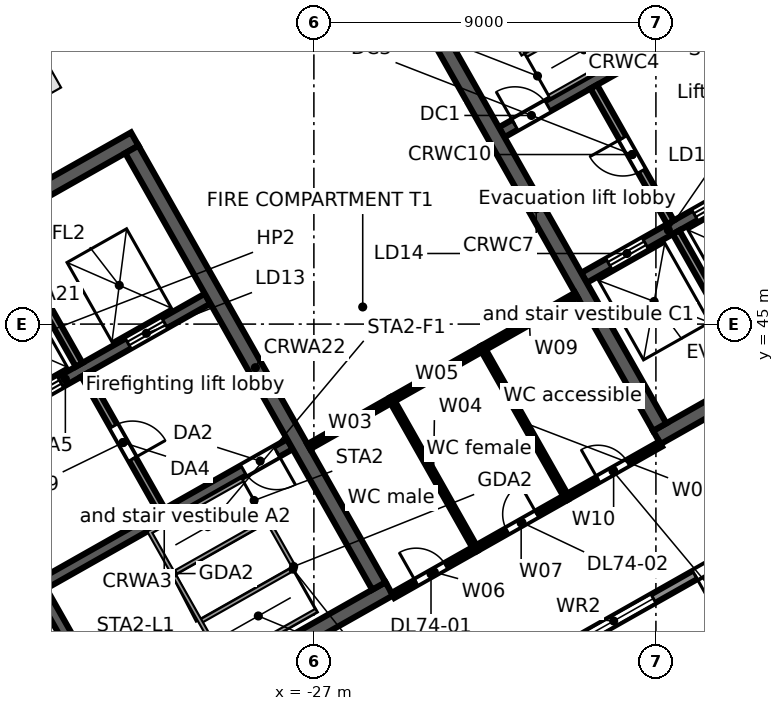
"""IFC4 building model, lengths in metres.
Left out: names, types, materials, properties, quantities, classifications, styles, units other than length and angle.
Written with IfcOpenShell. Run it as: python <this file> out.ifc"""

import sys

from ifc_helpers import new_model, si_unit, direction, frame, frame_2d, origin, origin_2d, place, context, subcontext, project, spatial, rectangle, extrude, element, fill, save


model = new_model("IFC4")
c1 = context("Model", 3, precision=1e-05, world=origin(), true_north=direction((0.0, 1.0)))
c2 = subcontext(c1, "Body", "Model", "MODEL_VIEW")
j1 = project(units=[si_unit("LENGTHUNIT", "METRE"), si_unit("PLANEANGLEUNIT", "RADIAN")], contexts=[c1])
p1 = place(None, origin())
s1 = spatial("IfcSite", under=j1, at=p1, CompositionType="ELEMENT")
p2 = place(p1, origin())
s2 = spatial("IfcBuilding", under=s1, at=p2, CompositionType="ELEMENT")
p3 = place(p2, frame((0.0, 0.0, 335.5)))
s3 = spatial("IfcBuildingStorey", under=s2, at=p3, CompositionType="ELEMENT", Elevation=335.5)
p4 = place(p3, frame((-34.334, 51.414, 0.0), z_axis=(0.0, 0.0, 1.0), x_axis=(-0.87035569594, -0.492423560103, 0.0)))
e1 = element("IfcColumn", 1, at=p4, inside=s3, PredefinedType="COLUMN", context=c2, shape_type="SweptSolid", body=[
    extrude(rectangle(XDim=1.0, YDim=1.0, at=origin_2d()), origin(), (0.0, 0.0, 1.0), 3.8),
])
p5 = place(p3, frame((-3.017, 46.293, 0.0), z_axis=(0.0, 0.0, 1.0), x_axis=(-0.870355474887, -0.492423950812, 0.0)))
e2 = element("IfcWall", 2, at=p5, inside=s3, PredefinedType="STANDARD", context=c2, shape_type="SweptSolid", body=[
    extrude(rectangle(XDim=40.34, YDim=0.25, at=frame_2d((20.17, 0.0))), origin(), (0.0, 0.0, 1.0), 3.52),
])
p6 = place(p5, frame((37.428, 0.0, 0.8)))
e3 = element("IfcOpeningElement", 3, at=p6, cuts=e2, PredefinedType="OPENING", context=c2, shape_type="SweptSolid", body=[
    extrude(rectangle(XDim=2.4, YDim=2.2, at=frame_2d((1.2, 1.1))), frame((0.0, 0.135, 0.0), z_axis=(0.0, -1.0, 0.0), x_axis=(1.0, 0.0, 0.0)), (0.0, 0.0, 1.0), 0.27),
])
p7 = place(p5, frame((34.372, 0.0, 0.0)))
e4 = element("IfcOpeningElement", 4, at=p7, cuts=e2, PredefinedType="OPENING", context=c2, shape_type="SweptSolid", body=[
    extrude(rectangle(XDim=1.8, YDim=2.4, at=frame_2d((0.9, 1.2))), frame((0.0, 0.135, 0.0), z_axis=(0.0, -1.0, 0.0), x_axis=(1.0, 0.0, 0.0)), (0.0, 0.0, 1.0), 0.27),
])
p8 = place(p5, frame((30.716, 0.0, 0.8)))
e5 = element("IfcOpeningElement", 5, at=p8, cuts=e2, PredefinedType="OPENING", context=c2, shape_type="SweptSolid", body=[
    extrude(rectangle(XDim=2.4, YDim=2.2, at=frame_2d((1.2, 1.1))), frame((0.0, 0.135, 0.0), z_axis=(0.0, -1.0, 0.0), x_axis=(1.0, 0.0, 0.0)), (0.0, 0.0, 1.0), 0.27),
])
p9 = place(p5, frame((27.36, 0.0, 0.8)))
e6 = element("IfcOpeningElement", 6, at=p9, cuts=e2, PredefinedType="OPENING", context=c2, shape_type="SweptSolid", body=[
    extrude(rectangle(XDim=2.4, YDim=2.2, at=frame_2d((1.2, 1.1))), frame((0.0, 0.135, 0.0), z_axis=(0.0, -1.0, 0.0), x_axis=(1.0, 0.0, 0.0)), (0.0, 0.0, 1.0), 0.27),
])
p10 = place(p5, frame((24.304, 0.0, 0.0)))
e7 = element("IfcOpeningElement", 7, at=p10, cuts=e2, PredefinedType="OPENING", context=c2, shape_type="SweptSolid", body=[
    extrude(rectangle(XDim=1.8, YDim=2.4, at=frame_2d((0.9, 1.2))), frame((0.0, 0.135, 0.0), z_axis=(0.0, -1.0, 0.0), x_axis=(1.0, 0.0, 0.0)), (0.0, 0.0, 1.0), 0.27),
])
p11 = place(p5, frame((20.648, 0.0, 0.8)))
e8 = element("IfcOpeningElement", 8, at=p11, cuts=e2, PredefinedType="OPENING", context=c2, shape_type="SweptSolid", body=[
    extrude(rectangle(XDim=2.4, YDim=2.2, at=frame_2d((1.2, 1.1))), frame((0.0, 0.135, 0.0), z_axis=(0.0, -1.0, 0.0), x_axis=(1.0, 0.0, 0.0)), (0.0, 0.0, 1.0), 0.27),
])
p12 = place(p5, frame((17.292, 0.0, 0.8)))
e9 = element("IfcOpeningElement", 9, at=p12, cuts=e2, PredefinedType="OPENING", context=c2, shape_type="SweptSolid", body=[
    extrude(rectangle(XDim=2.4, YDim=2.2, at=frame_2d((1.2, 1.1))), frame((0.0, 0.135, 0.0), z_axis=(0.0, -1.0, 0.0), x_axis=(1.0, 0.0, 0.0)), (0.0, 0.0, 1.0), 0.27),
])
p13 = place(p5, frame((14.236, 0.0, 0.0)))
e10 = element("IfcOpeningElement", 10, at=p13, cuts=e2, PredefinedType="OPENING", context=c2, shape_type="SweptSolid", body=[
    extrude(rectangle(XDim=1.8, YDim=2.4, at=frame_2d((0.9, 1.2))), frame((0.0, 0.135, 0.0), z_axis=(0.0, -1.0, 0.0), x_axis=(1.0, 0.0, 0.0)), (0.0, 0.0, 1.0), 0.27),
])
p14 = place(p5, frame((10.58, 0.0, 0.8)))
e11 = element("IfcOpeningElement", 11, at=p14, cuts=e2, PredefinedType="OPENING", context=c2, shape_type="SweptSolid", body=[
    extrude(rectangle(XDim=2.4, YDim=2.2, at=frame_2d((1.2, 1.1))), frame((0.0, 0.135, 0.0), z_axis=(0.0, -1.0, 0.0), x_axis=(1.0, 0.0, 0.0)), (0.0, 0.0, 1.0), 0.27),
])
p15 = place(p5, frame((7.224, 0.0, 0.8)))
e12 = element("IfcOpeningElement", 12, at=p15, cuts=e2, PredefinedType="OPENING", context=c2, shape_type="SweptSolid", body=[
    extrude(rectangle(XDim=2.4, YDim=2.2, at=frame_2d((1.2, 1.1))), frame((0.0, 0.135, 0.0), z_axis=(0.0, -1.0, 0.0), x_axis=(1.0, 0.0, 0.0)), (0.0, 0.0, 1.0), 0.27),
])
p16 = place(p5, frame((4.168, 0.0, 0.0)))
e13 = element("IfcOpeningElement", 13, at=p16, cuts=e2, PredefinedType="OPENING", context=c2, shape_type="SweptSolid", body=[
    extrude(rectangle(XDim=1.8, YDim=2.4, at=frame_2d((0.9, 1.2))), frame((0.0, 0.135, 0.0), z_axis=(0.0, -1.0, 0.0), x_axis=(1.0, 0.0, 0.0)), (0.0, 0.0, 1.0), 0.27),
])
p17 = place(p5, frame((0.512, 0.0, 0.8)))
e14 = element("IfcOpeningElement", 14, at=p17, cuts=e2, PredefinedType="OPENING", context=c2, shape_type="SweptSolid", body=[
    extrude(rectangle(XDim=2.4, YDim=2.2, at=frame_2d((1.2, 1.1))), frame((0.0, 0.135, 0.0), z_axis=(0.0, -1.0, 0.0), x_axis=(1.0, 0.0, 0.0)), (0.0, 0.0, 1.0), 0.27),
])
p18 = place(p3, frame((-39.813, 29.662, 0.0), z_axis=(0.0, 0.0, 1.0), x_axis=(0.870350116061, 0.492433422375, 0.0)))
e15 = element("IfcWall", 15, at=p18, inside=s3, PredefinedType="SOLIDWALL", context=c2, shape_type="SweptSolid", body=[
    extrude(rectangle(XDim=17.0, YDim=0.4, at=frame_2d((8.5, 0.0))), origin(), (0.0, 0.0, 1.0), 3.52),
])
p19 = place(p18, frame((7.2, 0.0, 0.0)))
e16 = element("IfcOpeningElement", 16, at=p19, cuts=e15, PredefinedType="OPENING", context=c2, shape_type="SweptSolid", body=[
    extrude(rectangle(XDim=1.2, YDim=2.1, at=frame_2d((0.6, 1.05))), frame((0.0, 0.21, 0.0), z_axis=(0.0, -1.0, 0.0), x_axis=(1.0, 0.0, 0.0)), (0.0, 0.0, 1.0), 0.42),
])
p20 = place(p3, frame((-34.245, 38.097, 0.0), z_axis=(0.0, 0.0, 1.0), x_axis=(0.870356351998, 0.492422400523, 0.0)))
e17 = element("IfcWall", 17, at=p20, inside=s3, PredefinedType="SOLIDWALL", context=c2, shape_type="SweptSolid", body=[
    extrude(rectangle(XDim=7.6, YDim=0.3, at=frame_2d((3.8, 0.0))), origin(), (0.0, 0.0, 1.0), 3.52),
])
p21 = place(p20, frame((6.2, 0.0, 0.0)))
e18 = element("IfcOpeningElement", 18, at=p21, cuts=e17, PredefinedType="OPENING", context=c2, shape_type="SweptSolid", body=[
    extrude(rectangle(XDim=1.0, YDim=2.1, at=frame_2d((0.5, 1.05))), frame((0.0, 0.16, 0.0), z_axis=(0.0, -1.0, 0.0), x_axis=(1.0, 0.0, 0.0)), (0.0, 0.0, 1.0), 0.32),
])
p22 = place(p3, frame((-37.282, 41.435, 0.0), z_axis=(0.0, 0.0, 1.0), x_axis=(0.870361315115, 0.492413628113, 0.0)))
e19 = element("IfcWall", 19, at=p22, inside=s3, PredefinedType="SOLIDWALL", context=c2, shape_type="SweptSolid", body=[
    extrude(rectangle(XDim=8.6, YDim=0.3, at=frame_2d((4.3, 0.0))), origin(), (0.0, 0.0, 1.0), 3.52),
])
p23 = place(p22, frame((0.65, 0.0, 0.0)))
e20 = element("IfcOpeningElement", 20, at=p23, cuts=e19, PredefinedType="OPENING", context=c2, shape_type="SweptSolid", body=[
    extrude(rectangle(XDim=1.1, YDim=2.1, at=frame_2d((0.55, 1.05))), frame((0.0, 0.16, 0.0), z_axis=(0.0, -1.0, 0.0), x_axis=(1.0, 0.0, 0.0)), (0.0, 0.0, 1.0), 0.32),
])
p24 = place(p22, frame((3.05, 0.0, 0.0)))
e21 = element("IfcOpeningElement", 21, at=p24, cuts=e19, PredefinedType="OPENING", context=c2, shape_type="SweptSolid", body=[
    extrude(rectangle(XDim=1.1, YDim=2.1, at=frame_2d((0.55, 1.05))), frame((0.0, 0.16, 0.0), z_axis=(0.0, -1.0, 0.0), x_axis=(1.0, 0.0, 0.0)), (0.0, 0.0, 1.0), 0.32),
])
p25 = place(p22, frame((6.2, 0.0, 0.0)))
e22 = element("IfcOpeningElement", 22, at=p25, cuts=e19, PredefinedType="OPENING", context=c2, shape_type="SweptSolid", body=[
    extrude(rectangle(XDim=1.1, YDim=2.1, at=frame_2d((0.55, 1.05))), frame((0.0, 0.16, 0.0), z_axis=(0.0, -1.0, 0.0), x_axis=(1.0, 0.0, 0.0)), (0.0, 0.0, 1.0), 0.32),
])
p26 = place(p3, frame((-46.51, 41.499, 0.0), z_axis=(0.0, 0.0, 1.0), x_axis=(0.870356271124, 0.492422543467, 0.0)))
e23 = element("IfcWall", 23, at=p26, inside=s3, PredefinedType="SOLIDWALL", context=c2, shape_type="SweptSolid", body=[
    extrude(rectangle(XDim=17.0, YDim=0.4, at=frame_2d((8.5, 0.0))), origin(), (0.0, 0.0, 1.0), 3.52),
])
p27 = place(p3, frame((-34.171, 37.967, 0.0), z_axis=(0.0, 0.0, 1.0), x_axis=(0.492422543467, -0.870356271124, 0.0)))
e24 = element("IfcWall", 24, at=p27, inside=s3, PredefinedType="SOLIDWALL", context=c2, shape_type="SweptSolid", body=[
    extrude(rectangle(XDim=4.25, YDim=0.3, at=frame_2d((2.125, 0.0))), origin(), (0.0, 0.0, 1.0), 3.52),
])
p28 = place(p3, frame((-33.031, 43.667, 0.0), z_axis=(0.0, 0.0, 1.0), x_axis=(0.492408451753, -0.87036424366, 0.0)))
e25 = element("IfcWall", 25, at=p28, inside=s3, PredefinedType="PARTITIONING", context=c2, shape_type="SweptSolid", body=[
    extrude(rectangle(XDim=4.1, YDim=0.2, at=frame_2d((2.05, 0.0))), origin(), (0.0, 0.0, 1.0), 3.52),
])
p29 = place(p28, frame((1.55, 0.0, 0.0)))
e26 = element("IfcOpeningElement", 26, at=p29, cuts=e25, PredefinedType="OPENING", context=c2, shape_type="SweptSolid", body=[
    extrude(rectangle(XDim=1.0, YDim=2.1, at=frame_2d((0.5, 1.05))), frame((0.0, 0.11, 0.0), z_axis=(0.0, -1.0, 0.0), x_axis=(1.0, 0.0, 0.0)), (0.0, 0.0, 1.0), 0.22),
])
p30 = place(p3, frame((-35.271, 47.628, 0.0), z_axis=(0.0, 0.0, 1.0), x_axis=(0.492422543467, -0.870356271124, 0.0)))
e27 = element("IfcWall", 27, at=p30, inside=s3, PredefinedType="SOLIDWALL", context=c2, shape_type="SweptSolid", body=[
    extrude(rectangle(XDim=4.25, YDim=0.2, at=frame_2d((2.125, 0.0))), origin(), (0.0, 0.0, 1.0), 3.52),
])
p31 = place(p3, frame((-31.79, 49.597, 0.0), z_axis=(0.0, 0.0, 1.0), x_axis=(0.492421663121, -0.870356769198, 0.0)))
e28 = element("IfcWall", 28, at=p31, inside=s3, PredefinedType="SOLIDWALL", context=c2, shape_type="SweptSolid", body=[
    extrude(rectangle(XDim=13.2, YDim=0.4, at=frame_2d((6.6, 0.0))), origin(), (0.0, 0.0, 1.0), 3.52),
])
p32 = place(p3, frame((-17.975, 42.017, 0.0), z_axis=(0.0, 0.0, 1.0), x_axis=(0.87034965173, 0.492434243055, 0.0)))
e29 = element("IfcWall", 29, at=p32, inside=s3, PredefinedType="SOLIDWALL", context=c2, shape_type="SweptSolid", body=[
    extrude(rectangle(XDim=15.0, YDim=0.4, at=frame_2d((7.5, 0.0))), origin(), (0.0, 0.0, 1.0), 3.52),
])
p33 = place(p32, frame((6.1, 0.0, 0.0)))
e30 = element("IfcOpeningElement", 30, at=p33, cuts=e29, PredefinedType="OPENING", context=c2, shape_type="SweptSolid", body=[
    extrude(rectangle(XDim=1.2, YDim=2.1, at=frame_2d((0.6, 1.05))), frame((0.0, 0.21, 0.0), z_axis=(0.0, -1.0, 0.0), x_axis=(1.0, 0.0, 0.0)), (0.0, 0.0, 1.0), 0.42),
])
p34 = place(p3, frame((-19.892, 46.218, 0.0), z_axis=(0.0, 0.0, 1.0), x_axis=(0.870341639186, 0.492448404505, 0.0)))
e31 = element("IfcWall", 31, at=p34, inside=s3, PredefinedType="SOLIDWALL", context=c2, shape_type="SweptSolid", body=[
    extrude(rectangle(XDim=5.1, YDim=0.3, at=frame_2d((2.55, 0.0))), origin(), (0.0, 0.0, 1.0), 3.52),
])
p35 = place(p34, frame((0.75, 0.0, 0.0)))
e32 = element("IfcOpeningElement", 32, at=p35, cuts=e31, PredefinedType="OPENING", context=c2, shape_type="SweptSolid", body=[
    extrude(rectangle(XDim=1.1, YDim=2.1, at=frame_2d((0.55, 1.05))), frame((0.0, 0.16, 0.0), z_axis=(0.0, -1.0, 0.0), x_axis=(1.0, 0.0, 0.0)), (0.0, 0.0, 1.0), 0.32),
])
p36 = place(p34, frame((3.35, 0.0, 0.0)))
e33 = element("IfcOpeningElement", 33, at=p36, cuts=e31, PredefinedType="OPENING", context=c2, shape_type="SweptSolid", body=[
    extrude(rectangle(XDim=1.1, YDim=2.1, at=frame_2d((0.55, 1.05))), frame((0.0, 0.16, 0.0), z_axis=(0.0, -1.0, 0.0), x_axis=(1.0, 0.0, 0.0)), (0.0, 0.0, 1.0), 0.32),
])
p37 = place(p3, frame((-22.059, 50.047, 0.0), z_axis=(0.0, 0.0, 1.0), x_axis=(0.87035077051, 0.49243226567, 0.0)))
e34 = element("IfcWall", 34, at=p37, inside=s3, PredefinedType="SOLIDWALL", context=c2, shape_type="SweptSolid", body=[
    extrude(rectangle(XDim=7.4, YDim=0.3, at=frame_2d((3.7, 0.0))), origin(), (0.0, 0.0, 1.0), 3.52),
])
p38 = place(p37, frame((0.4, 0.0, 0.0)))
e35 = element("IfcOpeningElement", 35, at=p38, cuts=e34, PredefinedType="OPENING", context=c2, shape_type="SweptSolid", body=[
    extrude(rectangle(XDim=1.0, YDim=2.1, at=frame_2d((0.5, 1.05))), frame((0.0, 0.16, 0.0), z_axis=(0.0, -1.0, 0.0), x_axis=(1.0, 0.0, 0.0)), (0.0, 0.0, 1.0), 0.32),
])
p39 = place(p3, frame((-24.4, 53.779, 0.0), z_axis=(0.0, 0.0, 1.0), x_axis=(0.492421663121, -0.870356769198, 0.0)))
e36 = element("IfcWall", 36, at=p39, inside=s3, PredefinedType="SOLIDWALL", context=c2, shape_type="SweptSolid", body=[
    extrude(rectangle(XDim=13.2, YDim=0.4, at=frame_2d((6.6, 0.0))), origin(), (0.0, 0.0, 1.0), 3.52),
])
p40 = place(p3, frame((-17.469, 47.417, 0.0), z_axis=(0.0, 0.0, 1.0), x_axis=(0.492466057713, -0.870331650579, 0.0)))
e37 = element("IfcWall", 37, at=p40, inside=s3, PredefinedType="SOLIDWALL", context=c2, shape_type="SweptSolid", body=[
    extrude(rectangle(XDim=4.25, YDim=0.2, at=frame_2d((2.125, 0.0))), origin(), (0.0, 0.0, 1.0), 3.52),
])
p41 = place(p3, frame((-19.635, 51.246, 0.0), z_axis=(0.0, 0.0, 1.0), x_axis=(0.492408451753, -0.87036424366, 0.0)))
e38 = element("IfcWall", 38, at=p41, inside=s3, PredefinedType="PARTITIONING", context=c2, shape_type="SweptSolid", body=[
    extrude(rectangle(XDim=4.1, YDim=0.2, at=frame_2d((2.05, 0.0))), origin(), (0.0, 0.0, 1.0), 3.52),
])
p42 = place(p41, frame((1.55, 0.0, 0.0)))
e39 = element("IfcOpeningElement", 39, at=p42, cuts=e38, PredefinedType="OPENING", context=c2, shape_type="SweptSolid", body=[
    extrude(rectangle(XDim=1.0, YDim=2.1, at=frame_2d((0.5, 1.05))), frame((0.0, 0.11, 0.0), z_axis=(0.0, -1.0, 0.0), x_axis=(1.0, 0.0, 0.0)), (0.0, 0.0, 1.0), 0.22),
])
p43 = place(p3, frame((-27.134, 41.776, 0.0), z_axis=(0.0, 0.0, 1.0), x_axis=(0.870249744125, 0.492610782312, 0.0)))
e40 = element("IfcWall", 40, at=p43, inside=s3, PredefinedType="PARTITIONING", context=c2, shape_type="SweptSolid", body=[
    extrude(rectangle(XDim=2.499, YDim=0.15, at=frame_2d((1.25, 0.0))), origin(), (0.0, 0.0, 1.0), 2.792),
])
p44 = place(p3, frame((-24.959, 43.007, 0.0), z_axis=(0.0, 0.0, 1.0), x_axis=(0.492412939134, -0.87036170491, 0.0)))
e41 = element("IfcWall", 41, at=p44, inside=s3, PredefinedType="PARTITIONING", context=c2, shape_type="SweptSolid", body=[
    extrude(rectangle(XDim=4.5, YDim=0.125, at=frame_2d((2.25, 0.0))), origin(), (0.0, 0.0, 1.0), 3.52),
])
p45 = place(p3, frame((-24.959, 43.007, 0.0), z_axis=(0.0, 0.0, 1.0), x_axis=(0.870430549821, 0.492291232848, 0.0)))
e42 = element("IfcWall", 42, at=p45, inside=s3, PredefinedType="PARTITIONING", context=c2, shape_type="SweptSolid", body=[
    extrude(rectangle(XDim=2.75, YDim=0.15, at=frame_2d((1.375, 0.0))), origin(), (0.0, 0.0, 1.0), 3.52),
])
p46 = place(p3, frame((-24.919, 37.859, 0.0), z_axis=(0.0, 0.0, 1.0), x_axis=(0.870344512032, 0.49244332707, 0.0)))
e43 = element("IfcWall", 43, at=p46, inside=s3, PredefinedType="PARTITIONING", context=c2, shape_type="SweptSolid", body=[
    extrude(rectangle(XDim=2.5, YDim=0.15, at=frame_2d((1.25, 0.0))), origin(), (0.0, 0.0, 1.0), 2.792),
])
p47 = place(p46, frame((0.7, 0.0, 0.0)))
e44 = element("IfcOpeningElement", 44, at=p47, cuts=e43, PredefinedType="OPENING", context=c2, shape_type="SweptSolid", body=[
    extrude(rectangle(XDim=0.9, YDim=2.1, at=frame_2d((0.45, 1.05))), frame((0.0, 0.085, 0.0), z_axis=(0.0, -1.0, 0.0), x_axis=(1.0, 0.0, 0.0)), (0.0, 0.0, 1.0), 0.17),
])
p48 = place(p3, frame((-22.743, 39.09, 0.0), z_axis=(0.0, 0.0, 1.0), x_axis=(0.870409035047, 0.492329271634, 0.0)))
e45 = element("IfcWall", 45, at=p48, inside=s3, PredefinedType="PARTITIONING", context=c2, shape_type="SweptSolid", body=[
    extrude(rectangle(XDim=2.75, YDim=0.15, at=frame_2d((1.375, 0.0))), origin(), (0.0, 0.0, 1.0), 3.52),
])
p49 = place(p48, frame((0.95, 0.0, 0.0)))
e46 = element("IfcOpeningElement", 46, at=p49, cuts=e45, PredefinedType="OPENING", context=c2, shape_type="SweptSolid", body=[
    extrude(rectangle(XDim=0.9, YDim=2.1, at=frame_2d((0.45, 1.05))), frame((0.0, 0.085, 0.0), z_axis=(0.0, -1.0, 0.0), x_axis=(1.0, 0.0, 0.0)), (0.0, 0.0, 1.0), 0.17),
])
p50 = place(p3, frame((-22.565, 44.361, 0.0), z_axis=(0.0, 0.0, 1.0), x_axis=(0.492371842706, -0.870384954207, 0.0)))
e47 = element("IfcWall", 47, at=p50, inside=s3, PredefinedType="PARTITIONING", context=c2, shape_type="SweptSolid", body=[
    extrude(rectangle(XDim=4.5, YDim=0.125, at=frame_2d((2.25, 0.0))), origin(), (0.0, 0.0, 1.0), 3.52),
])
p51 = place(p3, frame((-22.565, 44.361, 0.0), z_axis=(0.0, 0.0, 1.0), x_axis=(0.87029856663, 0.492524522152, 0.0)))
e48 = element("IfcWall", 48, at=p51, inside=s3, PredefinedType="PARTITIONING", context=c2, shape_type="SweptSolid", body=[
    extrude(rectangle(XDim=2.84, YDim=0.15, at=frame_2d((1.42, 0.0))), origin(), (0.0, 0.0, 1.0), 3.52),
])
p52 = place(p3, frame((-20.349, 40.444, 0.0), z_axis=(0.0, 0.0, 1.0), x_axis=(0.87031941539, 0.492487680247, 0.0)))
e49 = element("IfcWall", 49, at=p52, inside=s3, PredefinedType="PARTITIONING", context=c2, shape_type="SweptSolid", body=[
    extrude(rectangle(XDim=2.841, YDim=0.15, at=frame_2d((1.42, 0.0))), origin(), (0.0, 0.0, 1.0), 3.52),
])
p53 = place(p52, frame((0.95, 0.0, 0.0)))
e50 = element("IfcOpeningElement", 50, at=p53, cuts=e49, PredefinedType="OPENING", context=c2, shape_type="SweptSolid", body=[
    extrude(rectangle(XDim=0.9, YDim=2.1, at=frame_2d((0.45, 1.05))), frame((0.0, 0.085, 0.0), z_axis=(0.0, -1.0, 0.0), x_axis=(1.0, 0.0, 0.0)), (0.0, 0.0, 1.0), 0.17),
])
p54 = place(p12, origin())
e51 = element("IfcWindow", 51, at=p54, inside=s3, PartitioningType="SINGLE_PANEL", PredefinedType="WINDOW", context=c2, shape_type="SweptSolid", body=[
    extrude(rectangle(XDim=2.4, YDim=2.2, at=frame_2d((1.2, 1.1))), frame((0.0, 0.03, 0.0), z_axis=(0.0, -1.0, 0.0), x_axis=(1.0, 0.0, 0.0)), (0.0, 0.0, 1.0), 0.06),
])
fill(e9, e51)
p55 = place(p13, origin())
e52 = element("IfcDoor", 52, at=p55, inside=s3, OperationType="DOUBLE_DOOR_SINGLE_SWING", PredefinedType="DOOR", context=c2, shape_type="SweptSolid", body=[
    extrude(rectangle(XDim=1.8, YDim=2.4, at=frame_2d((0.9, 1.2))), frame((0.0, 0.025, 0.0), z_axis=(0.0, -1.0, 0.0), x_axis=(1.0, 0.0, 0.0)), (0.0, 0.0, 1.0), 0.05),
])
fill(e10, e52)
p56 = place(p24, origin())
e53 = element("IfcDoor", 53, at=p56, inside=s3, OperationType="DOUBLE_DOOR_SLIDING", PredefinedType="DOOR", context=c2, shape_type="SweptSolid", body=[
    extrude(rectangle(XDim=1.1, YDim=2.1, at=frame_2d((0.55, 1.05))), frame((0.0, 0.025, 0.0), z_axis=(0.0, -1.0, 0.0), x_axis=(1.0, 0.0, 0.0)), (0.0, 0.0, 1.0), 0.05),
])
fill(e21, e53)
p57 = place(p25, origin())
e54 = element("IfcDoor", 54, at=p57, inside=s3, OperationType="DOUBLE_DOOR_SLIDING", PredefinedType="DOOR", context=c2, shape_type="SweptSolid", body=[
    extrude(rectangle(XDim=1.1, YDim=2.1, at=frame_2d((0.55, 1.05))), frame((0.0, 0.025, 0.0), z_axis=(0.0, -1.0, 0.0), x_axis=(1.0, 0.0, 0.0)), (0.0, 0.0, 1.0), 0.05),
])
fill(e22, e54)
p58 = place(p21, frame((1.0, 0.0, 0.0), z_axis=(0.0, 0.0, 1.0), x_axis=(-1.0, 0.0, 0.0)))
e55 = element("IfcDoor", 55, at=p58, inside=s3, OperationType="SINGLE_SWING_LEFT", PredefinedType="DOOR", context=c2, shape_type="SweptSolid", body=[
    extrude(rectangle(XDim=1.0, YDim=2.1, at=frame_2d((0.5, 1.05))), frame((0.0, 0.025, 0.0), z_axis=(0.0, -1.0, 0.0), x_axis=(1.0, 0.0, 0.0)), (0.0, 0.0, 1.0), 0.05),
])
fill(e18, e55)
p59 = place(p29, origin())
e56 = element("IfcDoor", 56, at=p59, inside=s3, OperationType="SINGLE_SWING_RIGHT", PredefinedType="DOOR", context=c2, shape_type="SweptSolid", body=[
    extrude(rectangle(XDim=1.0, YDim=2.1, at=frame_2d((0.5, 1.05))), frame((0.0, 0.025, 0.0), z_axis=(0.0, -1.0, 0.0), x_axis=(1.0, 0.0, 0.0)), (0.0, 0.0, 1.0), 0.05),
])
fill(e26, e56)
p60 = place(p35, origin())
e57 = element("IfcDoor", 57, at=p60, inside=s3, OperationType="DOUBLE_DOOR_SLIDING", PredefinedType="DOOR", context=c2, shape_type="SweptSolid", body=[
    extrude(rectangle(XDim=1.1, YDim=2.1, at=frame_2d((0.55, 1.05))), frame((0.0, 0.025, 0.0), z_axis=(0.0, -1.0, 0.0), x_axis=(1.0, 0.0, 0.0)), (0.0, 0.0, 1.0), 0.05),
])
fill(e32, e57)
p61 = place(p36, origin())
e58 = element("IfcDoor", 58, at=p61, inside=s3, OperationType="DOUBLE_DOOR_SLIDING", PredefinedType="DOOR", context=c2, shape_type="SweptSolid", body=[
    extrude(rectangle(XDim=1.1, YDim=2.1, at=frame_2d((0.55, 1.05))), frame((0.0, 0.025, 0.0), z_axis=(0.0, -1.0, 0.0), x_axis=(1.0, 0.0, 0.0)), (0.0, 0.0, 1.0), 0.05),
])
fill(e33, e58)
p62 = place(p38, origin())
e59 = element("IfcDoor", 59, at=p62, inside=s3, OperationType="SINGLE_SWING_LEFT", PredefinedType="DOOR", context=c2, shape_type="SweptSolid", body=[
    extrude(rectangle(XDim=1.0, YDim=2.1, at=frame_2d((0.5, 1.05))), frame((0.0, 0.025, 0.0), z_axis=(0.0, -1.0, 0.0), x_axis=(1.0, 0.0, 0.0)), (0.0, 0.0, 1.0), 0.05),
])
fill(e35, e59)
p63 = place(p42, frame((1.0, 0.0, 0.0), z_axis=(0.0, 0.0, 1.0), x_axis=(-1.0, 0.0, 0.0)))
e60 = element("IfcDoor", 60, at=p63, inside=s3, OperationType="SINGLE_SWING_RIGHT", PredefinedType="DOOR", context=c2, shape_type="SweptSolid", body=[
    extrude(rectangle(XDim=1.0, YDim=2.1, at=frame_2d((0.5, 1.05))), frame((0.0, 0.025, 0.0), z_axis=(0.0, -1.0, 0.0), x_axis=(1.0, 0.0, 0.0)), (0.0, 0.0, 1.0), 0.05),
])
fill(e39, e60)
p64 = place(p47, origin())
e61 = element("IfcDoor", 61, at=p64, inside=s3, OperationType="SINGLE_SWING_LEFT", PredefinedType="DOOR", context=c2, shape_type="SweptSolid", body=[
    extrude(rectangle(XDim=0.9, YDim=2.1, at=frame_2d((0.45, 1.05))), frame((0.0, 0.025, 0.0), z_axis=(0.0, -1.0, 0.0), x_axis=(1.0, 0.0, 0.0)), (0.0, 0.0, 1.0), 0.05),
])
fill(e44, e61)
p65 = place(p49, origin())
e62 = element("IfcDoor", 62, at=p65, inside=s3, OperationType="SINGLE_SWING_RIGHT", PredefinedType="DOOR", context=c2, shape_type="SweptSolid", body=[
    extrude(rectangle(XDim=0.9, YDim=2.1, at=frame_2d((0.45, 1.05))), frame((0.0, 0.025, 0.0), z_axis=(0.0, -1.0, 0.0), x_axis=(1.0, 0.0, 0.0)), (0.0, 0.0, 1.0), 0.05),
])
fill(e46, e62)
p66 = place(p53, origin())
e63 = element("IfcDoor", 63, at=p66, inside=s3, OperationType="SINGLE_SWING_LEFT", PredefinedType="DOOR", context=c2, shape_type="SweptSolid", body=[
    extrude(rectangle(XDim=0.9, YDim=2.1, at=frame_2d((0.45, 1.05))), frame((0.0, 0.025, 0.0), z_axis=(0.0, -1.0, 0.0), x_axis=(1.0, 0.0, 0.0)), (0.0, 0.0, 1.0), 0.05),
])
fill(e50, e63)
save(model, sys.argv[1])
